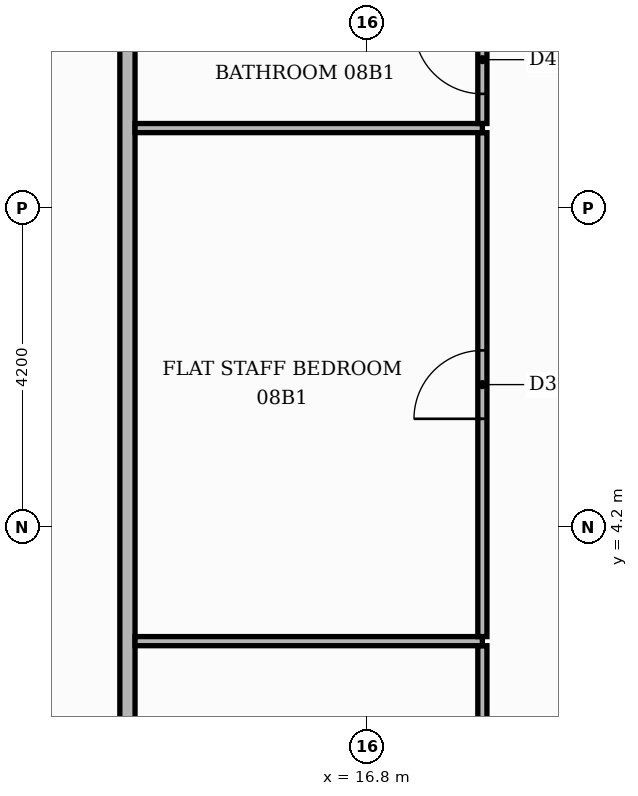
"""IFC4 building model, lengths in metres.
Left out: names, types, materials, properties, quantities, classifications, styles, units other than length and angle.
Written with IfcOpenShell. Run it as: python <this file> out.ifc"""

import sys

from ifc_helpers import new_model, si_unit, direction, frame, frame_2d, origin, place, context, subcontext, project, spatial, rectangle, extrude, element, fill, save


model = new_model("IFC4")
c1 = context("Model", 3, precision=1e-05, world=origin(), true_north=direction((0.0, 1.0)))
c2 = subcontext(c1, "Body", "Model", "MODEL_VIEW")
j1 = project(units=[si_unit("LENGTHUNIT", "METRE"), si_unit("PLANEANGLEUNIT", "RADIAN")], contexts=[c1])
p1 = place(None, origin())
s1 = spatial("IfcSite", under=j1, at=p1, CompositionType="ELEMENT")
p2 = place(p1, origin())
s2 = spatial("IfcBuilding", under=s1, at=p2, CompositionType="ELEMENT")
p3 = place(p2, frame((0.0, 0.0, 38.7)))
s3 = spatial("IfcBuildingStorey", under=s2, at=p3, CompositionType="ELEMENT", Elevation=38.7)
p4 = place(p3, frame((13.65, -13.55, 0.0), z_axis=(0.0, 0.0, 1.0), x_axis=(0.0, 1.0, 0.0)))
e1 = element("IfcWall", 1, at=p4, inside=s3, PredefinedType="PARTITIONING", context=c2, shape_type="SweptSolid", body=[
    extrude(rectangle(XDim=27.1, YDim=0.2, at=frame_2d((13.55, 0.0))), origin(), (0.0, 0.0, 1.0), 3.48),
])
p5 = place(p4, frame((2.5, 0.0, 0.0)))
e2 = element("IfcOpeningElement", 2, at=p5, cuts=e1, PredefinedType="OPENING", context=c2, shape_type="SweptSolid", body=[
    extrude(rectangle(XDim=1.1, YDim=2.4, at=frame_2d((0.55, 1.2))), frame((0.0, 0.11, 0.0), z_axis=(0.0, -1.0, 0.0), x_axis=(1.0, 0.0, 0.0)), (0.0, 0.0, 1.0), 0.22),
])
p6 = place(p3, frame((18.32, -1.44, 0.0), z_axis=(0.0, 0.0, 1.0), x_axis=(0.0, 1.0, 0.0)))
e3 = element("IfcWall", 3, at=p6, inside=s3, PredefinedType="PARTITIONING", context=c2, shape_type="SweptSolid", body=[
    extrude(rectangle(XDim=4.08, YDim=0.12, at=frame_2d((2.04, 0.0))), origin(), (0.0, 0.0, 1.0), 3.48),
])
p7 = place(p6, frame((1.59, 0.0, 0.0)))
e4 = element("IfcOpeningElement", 4, at=p7, cuts=e3, PredefinedType="OPENING", context=c2, shape_type="SweptSolid", body=[
    extrude(rectangle(XDim=0.9, YDim=2.1, at=frame_2d((0.45, 1.05))), frame((0.0, 0.07, 0.0), z_axis=(0.0, -1.0, 0.0), x_axis=(1.0, 0.0, 0.0)), (0.0, 0.0, 1.0), 0.14),
])
p8 = place(p3, frame((13.75, 2.7, 0.0), z_axis=(0.0, 0.0, 1.0), x_axis=(1.0, 0.0, 0.0)))
e5 = element("IfcWall", 5, at=p8, inside=s3, PredefinedType="PARTITIONING", context=c2, shape_type="SweptSolid", body=[
    extrude(rectangle(XDim=4.57, YDim=0.12, at=frame_2d((2.285, 0.0))), origin(), (0.0, 0.0, 1.0), 3.48),
])
p9 = place(p3, frame((18.32, 2.76, 0.0), z_axis=(0.0, 0.0, 1.0), x_axis=(0.0, 1.0, 0.0)))
e6 = element("IfcWall", 6, at=p9, inside=s3, PredefinedType="PARTITIONING", context=c2, shape_type="SweptSolid", body=[
    extrude(rectangle(XDim=6.63, YDim=0.12, at=frame_2d((3.315, 0.0))), origin(), (0.0, 0.0, 1.0), 3.48),
])
p10 = place(p9, frame((2.865, 0.0, 0.0)))
e7 = element("IfcOpeningElement", 7, at=p10, cuts=e6, PredefinedType="OPENING", context=c2, shape_type="SweptSolid", body=[
    extrude(rectangle(XDim=0.9, YDim=2.1, at=frame_2d((0.45, 1.05))), frame((0.0, 0.07, 0.0), z_axis=(0.0, -1.0, 0.0), x_axis=(1.0, 0.0, 0.0)), (0.0, 0.0, 1.0), 0.14),
])
p11 = place(p3, frame((13.75, 9.45, 0.0), z_axis=(0.0, 0.0, 1.0), x_axis=(1.0, 0.0, 0.0)))
e8 = element("IfcWall", 8, at=p11, inside=s3, PredefinedType="PARTITIONING", context=c2, shape_type="SweptSolid", body=[
    extrude(rectangle(XDim=4.57, YDim=0.12, at=frame_2d((2.285, 0.0))), origin(), (0.0, 0.0, 1.0), 3.48),
])
p12 = place(p3, frame((18.32, 9.51, 0.0), z_axis=(0.0, 0.0, 1.0), x_axis=(0.0, 1.0, 0.0)))
e9 = element("IfcWall", 9, at=p12, inside=s3, PredefinedType="PARTITIONING", context=c2, shape_type="SweptSolid", body=[
    extrude(rectangle(XDim=1.68, YDim=0.12, at=frame_2d((0.84, 0.0))), origin(), (0.0, 0.0, 1.0), 3.48),
])
p13 = place(p12, frame((0.39, 0.0, 0.0)))
e10 = element("IfcOpeningElement", 10, at=p13, cuts=e9, PredefinedType="OPENING", context=c2, shape_type="SweptSolid", body=[
    extrude(rectangle(XDim=0.9, YDim=2.1, at=frame_2d((0.45, 1.05))), frame((0.0, 0.07, 0.0), z_axis=(0.0, -1.0, 0.0), x_axis=(1.0, 0.0, 0.0)), (0.0, 0.0, 1.0), 0.14),
])
p14 = place(p10, origin())
e11 = element("IfcDoor", 11, at=p14, inside=s3, OperationType="SINGLE_SWING_LEFT", PredefinedType="DOOR", context=c2, shape_type="SweptSolid", body=[
    extrude(rectangle(XDim=0.9, YDim=2.1, at=frame_2d((0.45, 1.05))), frame((0.0, 0.025, 0.0), z_axis=(0.0, -1.0, 0.0), x_axis=(1.0, 0.0, 0.0)), (0.0, 0.0, 1.0), 0.05),
])
fill(e7, e11)
p15 = place(p13, origin())
e12 = element("IfcDoor", 12, at=p15, inside=s3, OperationType="SINGLE_SWING_RIGHT", PredefinedType="DOOR", context=c2, shape_type="SweptSolid", body=[
    extrude(rectangle(XDim=0.9, YDim=2.1, at=frame_2d((0.45, 1.05))), frame((0.0, 0.025, 0.0), z_axis=(0.0, -1.0, 0.0), x_axis=(1.0, 0.0, 0.0)), (0.0, 0.0, 1.0), 0.05),
])
fill(e10, e12)
save(model, sys.argv[1])
